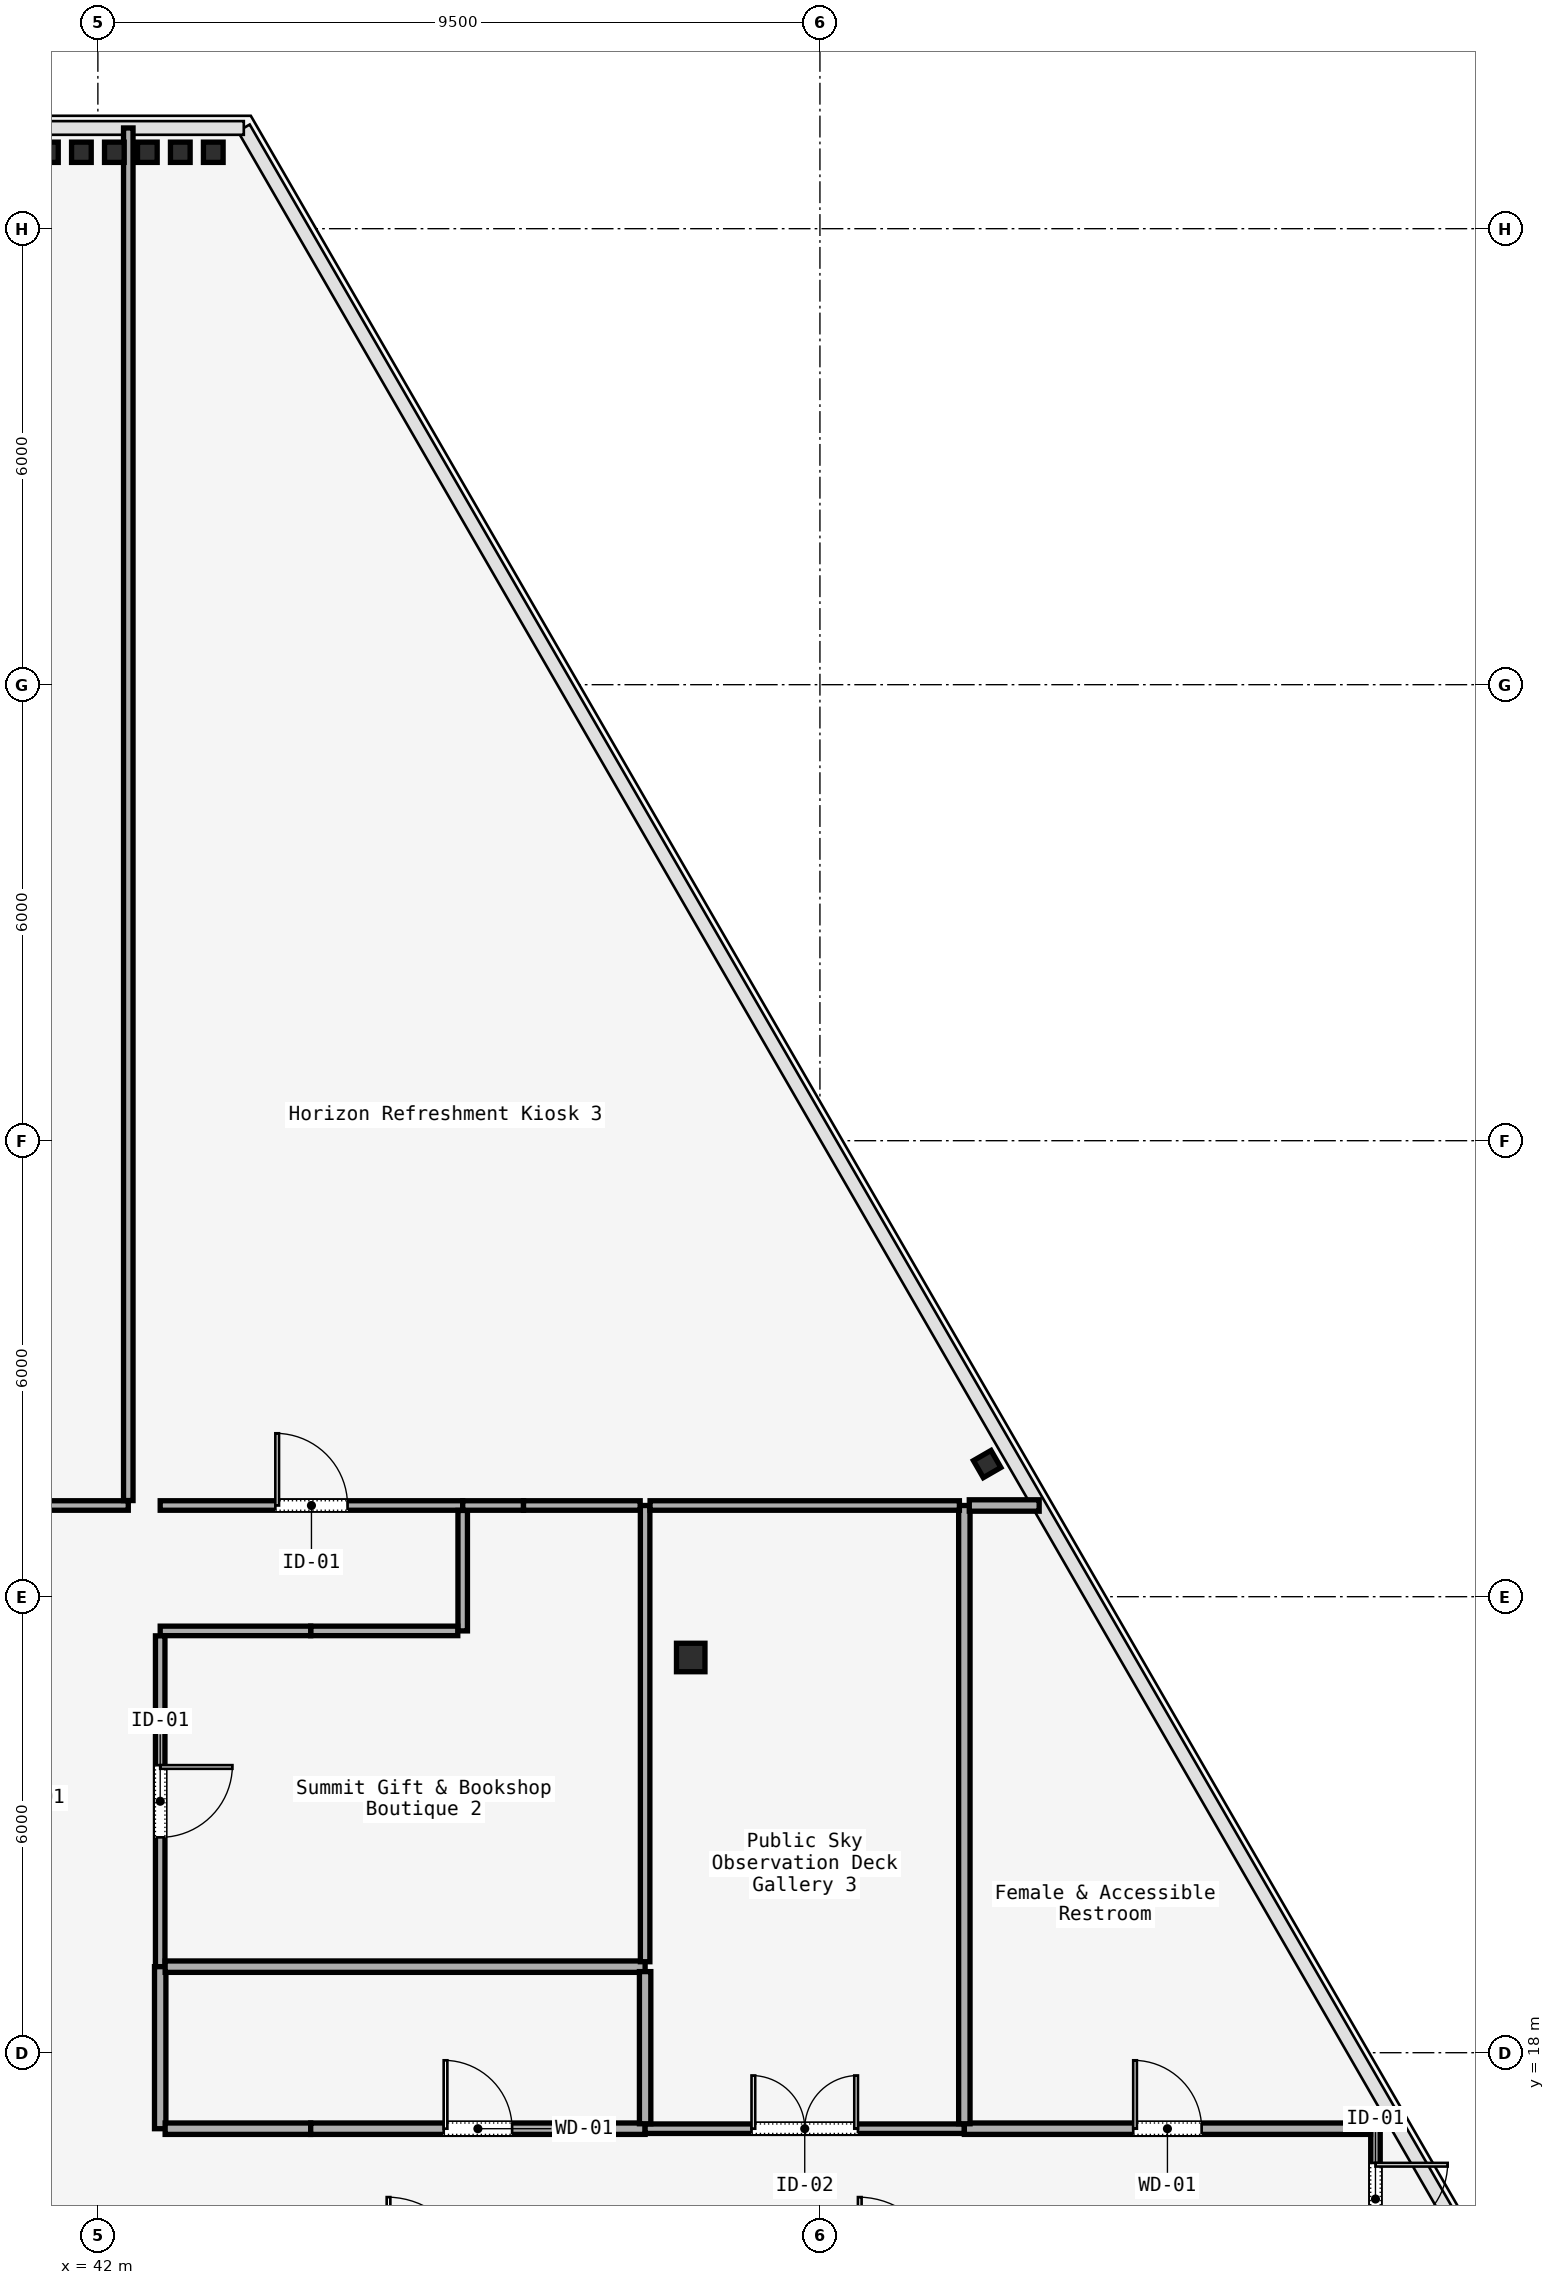
"""IFC4 building model, lengths in metres.
Left out: names, types, materials, properties, quantities, classifications, styles, units other than length and angle.
Written with IfcOpenShell. Run it as: python <this file> out.ifc"""

import sys

from ifc_helpers import new_model, si_unit, direction, frame, frame_2d, origin, origin_2d, place, context, subcontext, project, spatial, rectangle, i_section, extrude, element, fill, save


model = new_model("IFC4")
c1 = context("Model", 3, precision=1e-05, world=origin(), true_north=direction((0.0, 1.0)))
c2 = subcontext(c1, "Body", "Model", "MODEL_VIEW")
j1 = project(units=[si_unit("LENGTHUNIT", "METRE"), si_unit("PLANEANGLEUNIT", "RADIAN")], contexts=[c1])
p1 = place(None, origin())
s1 = spatial("IfcSite", under=j1, at=p1, CompositionType="ELEMENT")
p2 = place(p1, origin())
s2 = spatial("IfcBuilding", under=s1, at=p2, CompositionType="ELEMENT")
p3 = place(p2, frame((0.0, 0.0, 303.3)))
s3 = spatial("IfcBuildingStorey", under=s2, at=p3, CompositionType="ELEMENT", Elevation=303.3)
p4 = place(p3, frame((49.8, 23.2, 0.0), z_axis=(0.0, 0.0, 1.0), x_axis=(1.0, 0.0, 0.0)))
e1 = element("IfcColumn", 1, at=p4, inside=s3, PredefinedType="COLUMN", context=c2, shape_type="SweptSolid", body=[
    extrude(i_section(OverallWidth=0.375, OverallDepth=0.375, WebThickness=0.017, FlangeThickness=0.027, FilletRadius=0.015, at=origin_2d()), origin(), (0.0, 0.0, 1.0), 4.4),
])
for number, where, z_axis, x_axis in (
    (2, (53.7, 25.745, 0.0), (0.0, 0.0, 1.0), (-0.5, 0.866, 0.0)),
    (3, (43.518, 43.005, 0.0), (0.0, 0.0, 1.0), (1.0, 0.0, 0.0)),
    (4, (43.084, 43.005, 0.0), (0.0, 0.0, 1.0), (1.0, 0.0, 0.0)),
    (5, (42.651, 43.005, 0.0), (0.0, 0.0, 1.0), (1.0, 0.0, 0.0)),
    (6, (42.217, 43.005, 0.0), (0.0, 0.0, 1.0), (1.0, 0.0, 0.0)),
    (7, (41.783, 43.005, 0.0), (0.0, 0.0, 1.0), (1.0, 0.0, 0.0)),
    (8, (41.349, 43.005, 0.0), (0.0, 0.0, 1.0), (1.0, 0.0, 0.0)),
):
    element("IfcColumn", number, at=place(p3, frame(where, z_axis=z_axis, x_axis=x_axis)), inside=s3, PredefinedType="COLUMN", context=c2, shape_type="SweptSolid", body=[
        extrude(i_section(OverallWidth=0.259, OverallDepth=0.267, WebThickness=0.013, FlangeThickness=0.021, FilletRadius=0.013, at=origin_2d()), origin(), (0.0, 0.0, 1.0), 4.4),
    ])
p5 = place(p3, frame((58.809, 17.0, 0.0), z_axis=(0.0, 0.0, 1.0), x_axis=(0.0, -1.0, 0.0)))
e9 = element("IfcWall", 9, at=p5, inside=s3, PredefinedType="PARTITIONING", context=c2, shape_type="SweptSolid", body=[
    extrude(rectangle(XDim=1.85, YDim=0.125, at=frame_2d((0.925, 0.0))), origin(), (0.0, 0.0, 1.0), 4.36),
])
p6 = place(p5, frame((0.45, 0.0, 0.0)))
e10 = element("IfcOpeningElement", 10, at=p6, cuts=e9, PredefinedType="OPENING", context=c2, shape_type="SweptSolid", body=[
    extrude(rectangle(XDim=0.95, YDim=2.2, at=frame_2d((0.475, 1.1))), frame((0.0, 0.062, 0.0), z_axis=(0.0, -1.0, 0.0), x_axis=(1.0, 0.0, 0.0)), (0.0, 0.0, 1.0), 0.125),
])
p7 = place(p3, frame((41.18, 25.2, 0.0), z_axis=(0.0, 0.0, 1.0), x_axis=(1.0, 0.0, 0.0)))
e11 = element("IfcWall", 11, at=p7, inside=s3, PredefinedType="PARTITIONING", context=c2, shape_type="SweptSolid", body=[
    extrude(rectangle(XDim=1.22, YDim=0.125, at=frame_2d((0.61, 0.0))), origin(), (0.0, 0.0, 1.0), 4.36),
])
p8 = place(p3, frame((42.82, 25.2, 0.0), z_axis=(0.0, 0.0, 1.0), x_axis=(1.0, 0.0, 0.0)))
e12 = element("IfcWall", 12, at=p8, inside=s3, PredefinedType="PARTITIONING", context=c2, shape_type="SweptSolid", body=[
    extrude(rectangle(XDim=3.98, YDim=0.125, at=frame_2d((1.99, 0.0))), origin(), (0.0, 0.0, 1.0), 4.36),
])
p9 = place(p8, frame((1.515, 0.0, 0.0)))
e13 = element("IfcOpeningElement", 13, at=p9, cuts=e12, PredefinedType="OPENING", context=c2, shape_type="SweptSolid", body=[
    extrude(rectangle(XDim=0.95, YDim=2.2, at=frame_2d((0.475, 1.1))), frame((0.0, 0.062, 0.0), z_axis=(0.0, -1.0, 0.0), x_axis=(1.0, 0.0, 0.0)), (0.0, 0.0, 1.0), 0.125),
])
p10 = place(p3, frame((46.8, 25.135, 0.0), z_axis=(0.0, 0.0, 1.0), x_axis=(0.0, -1.0, 0.0)))
e14 = element("IfcWall", 14, at=p10, inside=s3, PredefinedType="PARTITIONING", context=c2, shape_type="SweptSolid", body=[
    extrude(rectangle(XDim=1.585, YDim=0.125, at=frame_2d((0.792, 0.0))), origin(), (0.0, 0.0, 1.0), 4.36),
])
p11 = place(p3, frame((46.735, 23.55, 0.0), z_axis=(0.0, 0.0, 1.0), x_axis=(-1.0, 0.0, 0.0)))
e15 = element("IfcWall", 15, at=p11, inside=s3, PredefinedType="PARTITIONING", context=c2, shape_type="SweptSolid", body=[
    extrude(rectangle(XDim=1.935, YDim=0.125, at=frame_2d((0.968, 0.0))), origin(), (0.0, 0.0, 1.0), 4.36),
])
p12 = place(p3, frame((44.8, 23.55, 0.0), z_axis=(0.0, 0.0, 1.0), x_axis=(-1.0, 0.0, 0.0)))
e16 = element("IfcWall", 16, at=p12, inside=s3, PredefinedType="PARTITIONING", context=c2, shape_type="SweptSolid", body=[
    extrude(rectangle(XDim=1.98, YDim=0.125, at=frame_2d((0.99, 0.0))), origin(), (0.0, 0.0, 1.0), 4.36),
])
p13 = place(p3, frame((42.82, 23.485, 0.0), z_axis=(0.0, 0.0, 1.0), x_axis=(0.0, -1.0, 0.0)))
e17 = element("IfcWall", 17, at=p13, inside=s3, PredefinedType="PARTITIONING", context=c2, shape_type="SweptSolid", body=[
    extrude(rectangle(XDim=4.353, YDim=0.125, at=frame_2d((2.177, 0.0))), origin(), (0.0, 0.0, 1.0), 4.36),
])
p14 = place(p13, frame((1.701, 0.0, 0.0)))
e18 = element("IfcOpeningElement", 18, at=p14, cuts=e17, PredefinedType="OPENING", context=c2, shape_type="SweptSolid", body=[
    extrude(rectangle(XDim=0.95, YDim=2.2, at=frame_2d((0.475, 1.1))), frame((0.0, 0.062, 0.0), z_axis=(0.0, -1.0, 0.0), x_axis=(1.0, 0.0, 0.0)), (0.0, 0.0, 1.0), 0.125),
])
p15 = place(p3, frame((42.82, 19.132, 0.0), z_axis=(0.0, 0.0, 1.0), x_axis=(0.0, -1.0, 0.0)))
e19 = element("IfcWall", 19, at=p15, inside=s3, PredefinedType="PARTITIONING", context=c2, shape_type="SweptSolid", body=[
    extrude(rectangle(XDim=2.132, YDim=0.15, at=frame_2d((1.066, 0.0))), origin(), (0.0, 0.0, 1.0), 4.36),
])
p16 = place(p3, frame((42.885, 17.0, 0.0), z_axis=(0.0, 0.0, 1.0), x_axis=(1.0, 0.0, 0.0)))
e20 = element("IfcWall", 20, at=p16, inside=s3, PredefinedType="PARTITIONING", context=c2, shape_type="SweptSolid", body=[
    extrude(rectangle(XDim=1.915, YDim=0.15, at=frame_2d((0.958, 0.0))), origin(), (0.0, 0.0, 1.0), 4.36),
])
p17 = place(p3, frame((44.8, 17.0, 0.0), z_axis=(0.0, 0.0, 1.0), x_axis=(1.0, 0.0, 0.0)))
e21 = element("IfcWall", 21, at=p17, inside=s3, PredefinedType="PARTITIONING", context=c2, shape_type="SweptSolid", body=[
    extrude(rectangle(XDim=4.4, YDim=0.15, at=frame_2d((2.2, 0.0))), origin(), (0.0, 0.0, 1.0), 4.36),
])
p18 = place(p17, frame((1.75, 0.0, 0.0)))
e22 = element("IfcOpeningElement", 22, at=p18, cuts=e21, PredefinedType="OPENING", context=c2, shape_type="SweptSolid", body=[
    extrude(rectangle(XDim=0.9, YDim=2.15, at=frame_2d((0.45, 1.075))), frame((0.0, 0.075, 0.0), z_axis=(0.0, -1.0, 0.0), x_axis=(1.0, 0.0, 0.0)), (0.0, 0.0, 1.0), 0.15),
])
p19 = place(p3, frame((49.2, 17.0, 0.0), z_axis=(0.0, 0.0, 1.0), x_axis=(1.0, 0.0, 0.0)))
e23 = element("IfcWall", 23, at=p19, inside=s3, PredefinedType="PARTITIONING", context=c2, shape_type="SweptSolid", body=[
    extrude(rectangle(XDim=4.2, YDim=0.125, at=frame_2d((2.1, 0.0))), origin(), (0.0, 0.0, 1.0), 4.36),
])
p20 = place(p19, frame((1.4, 0.0, 0.0)))
e24 = element("IfcOpeningElement", 24, at=p20, cuts=e23, PredefinedType="OPENING", context=c2, shape_type="SweptSolid", body=[
    extrude(rectangle(XDim=1.4, YDim=2.2, at=frame_2d((0.7, 1.1))), frame((0.0, 0.062, 0.0), z_axis=(0.0, -1.0, 0.0), x_axis=(1.0, 0.0, 0.0)), (0.0, 0.0, 1.0), 0.125),
])
p21 = place(p3, frame((53.4, 17.0, 0.0), z_axis=(0.0, 0.0, 1.0), x_axis=(1.0, 0.0, 0.0)))
e25 = element("IfcWall", 25, at=p21, inside=s3, PredefinedType="PARTITIONING", context=c2, shape_type="SweptSolid", body=[
    extrude(rectangle(XDim=5.344, YDim=0.15, at=frame_2d((2.672, 0.0))), origin(), (0.0, 0.0, 1.0), 4.36),
])
p22 = place(p21, frame((2.222, 0.0, 0.0)))
e26 = element("IfcOpeningElement", 26, at=p22, cuts=e25, PredefinedType="OPENING", context=c2, shape_type="SweptSolid", body=[
    extrude(rectangle(XDim=0.9, YDim=2.15, at=frame_2d((0.45, 1.075))), frame((0.0, 0.075, 0.0), z_axis=(0.0, -1.0, 0.0), x_axis=(1.0, 0.0, 0.0)), (0.0, 0.0, 1.0), 0.15),
])
p23 = place(p3, frame((42.885, 19.132, 0.0), z_axis=(0.0, 0.0, 1.0), x_axis=(1.0, 0.0, 0.0)))
e27 = element("IfcWall", 27, at=p23, inside=s3, PredefinedType="PARTITIONING", context=c2, shape_type="SweptSolid", body=[
    extrude(rectangle(XDim=6.315, YDim=0.15, at=frame_2d((3.157, 0.0))), origin(), (0.0, 0.0, 1.0), 4.36),
])
p24 = place(p3, frame((49.2, 19.067, 0.0), z_axis=(0.0, 0.0, 1.0), x_axis=(0.0, -1.0, 0.0)))
e28 = element("IfcWall", 28, at=p24, inside=s3, PredefinedType="PARTITIONING", context=c2, shape_type="SweptSolid", body=[
    extrude(rectangle(XDim=2.002, YDim=0.15, at=frame_2d((1.001, 0.0))), origin(), (0.0, 0.0, 1.0), 4.36),
])
p25 = place(p3, frame((53.4, 17.065, 0.0), z_axis=(0.0, 0.0, 1.0), x_axis=(0.0, 1.0, 0.0)))
e29 = element("IfcWall", 29, at=p25, inside=s3, PredefinedType="PARTITIONING", context=c2, shape_type="SweptSolid", body=[
    extrude(rectangle(XDim=8.135, YDim=0.15, at=frame_2d((4.067, 0.0))), origin(), (0.0, 0.0, 1.0), 4.36),
])
p26 = place(p3, frame((53.465, 25.2, 0.0), z_axis=(0.0, 0.0, 1.0), x_axis=(1.0, 0.0, 0.0)))
e30 = element("IfcWall", 30, at=p26, inside=s3, PredefinedType="PARTITIONING", context=c2, shape_type="SweptSolid", body=[
    extrude(rectangle(XDim=0.919, YDim=0.15, at=frame_2d((0.46, 0.0))), origin(), (0.0, 0.0, 1.0), 4.36),
])
p27 = place(p3, frame((49.2, 19.197, 0.0), z_axis=(0.0, 0.0, 1.0), x_axis=(0.0, 1.0, 0.0)))
e31 = element("IfcWall", 31, at=p27, inside=s3, PredefinedType="PARTITIONING", context=c2, shape_type="SweptSolid", body=[
    extrude(rectangle(XDim=6.003, YDim=0.125, at=frame_2d((3.001, 0.0))), origin(), (0.0, 0.0, 1.0), 4.36),
])
p28 = place(p3, frame((49.265, 25.2, 0.0), z_axis=(0.0, 0.0, 1.0), x_axis=(1.0, 0.0, 0.0)))
e32 = element("IfcWall", 32, at=p28, inside=s3, PredefinedType="PARTITIONING", context=c2, shape_type="SweptSolid", body=[
    extrude(rectangle(XDim=4.07, YDim=0.125, at=frame_2d((2.035, 0.0))), origin(), (0.0, 0.0, 1.0), 4.36),
])
p29 = place(p3, frame((46.8, 25.2, 0.0), z_axis=(0.0, 0.0, 1.0), x_axis=(1.0, 0.0, 0.0)))
e33 = element("IfcWall", 33, at=p29, inside=s3, PredefinedType="PARTITIONING", context=c2, shape_type="SweptSolid", body=[
    extrude(rectangle(XDim=0.8, YDim=0.125, at=frame_2d((0.4, 0.0))), origin(), (0.0, 0.0, 1.0), 4.36),
])
p30 = place(p3, frame((47.6, 25.2, 0.0), z_axis=(0.0, 0.0, 1.0), x_axis=(1.0, 0.0, 0.0)))
e34 = element("IfcWall", 34, at=p30, inside=s3, PredefinedType="PARTITIONING", context=c2, shape_type="SweptSolid", body=[
    extrude(rectangle(XDim=1.535, YDim=0.125, at=frame_2d((0.768, 0.0))), origin(), (0.0, 0.0, 1.0), 4.36),
])
p31 = place(p3, frame((42.4, 25.265, 0.0), z_axis=(0.0, 0.0, 1.0), x_axis=(0.0, 1.0, 0.0)))
e35 = element("IfcWall", 35, at=p31, inside=s3, PredefinedType="PARTITIONING", context=c2, shape_type="SweptSolid", body=[
    extrude(rectangle(XDim=18.061, YDim=0.125, at=frame_2d((9.03, 0.0))), origin(), (0.0, 0.0, 1.0), 4.36),
])
p32 = place(p6, origin())
e36 = element("IfcDoor", 36, at=p32, inside=s3, OperationType="SINGLE_SWING_RIGHT", PredefinedType="DOOR", context=c2, shape_type="SweptSolid", body=[
    extrude(rectangle(XDim=0.95, YDim=2.2, at=frame_2d((0.475, 1.1))), frame((0.0, 0.025, 0.0), z_axis=(0.0, -1.0, 0.0), x_axis=(1.0, 0.0, 0.0)), (0.0, 0.0, 1.0), 0.05),
])
fill(e10, e36)
p33 = place(p18, origin())
e37 = element("IfcDoor", 37, at=p33, inside=s3, OperationType="SINGLE_SWING_LEFT", PredefinedType="DOOR", context=c2, shape_type="SweptSolid", body=[
    extrude(rectangle(XDim=0.9, YDim=2.15, at=frame_2d((0.45, 1.075))), frame((0.0, 0.025, 0.0), z_axis=(0.0, -1.0, 0.0), x_axis=(1.0, 0.0, 0.0)), (0.0, 0.0, 1.0), 0.05),
])
fill(e22, e37)
p34 = place(p22, origin())
e38 = element("IfcDoor", 38, at=p34, inside=s3, OperationType="SINGLE_SWING_RIGHT", PredefinedType="DOOR", context=c2, shape_type="SweptSolid", body=[
    extrude(rectangle(XDim=0.9, YDim=2.15, at=frame_2d((0.45, 1.075))), frame((0.0, 0.025, 0.0), z_axis=(0.0, -1.0, 0.0), x_axis=(1.0, 0.0, 0.0)), (0.0, 0.0, 1.0), 0.05),
])
fill(e26, e38)
p35 = place(p20, origin())
e39 = element("IfcDoor", 39, at=p35, inside=s3, OperationType="SINGLE_SWING_RIGHT", PredefinedType="DOOR", context=c2, shape_type="SweptSolid", body=[
    extrude(rectangle(XDim=1.4, YDim=2.2, at=frame_2d((0.7, 1.1))), frame((0.0, 0.025, 0.0), z_axis=(0.0, -1.0, 0.0), x_axis=(1.0, 0.0, 0.0)), (0.0, 0.0, 1.0), 0.05),
])
fill(e24, e39)
p36 = place(p14, origin())
e40 = element("IfcDoor", 40, at=p36, inside=s3, OperationType="SINGLE_SWING_LEFT", PredefinedType="DOOR", context=c2, shape_type="SweptSolid", body=[
    extrude(rectangle(XDim=0.95, YDim=2.2, at=frame_2d((0.475, 1.1))), frame((0.0, 0.025, 0.0), z_axis=(0.0, -1.0, 0.0), x_axis=(1.0, 0.0, 0.0)), (0.0, 0.0, 1.0), 0.05),
])
fill(e18, e40)
p37 = place(p9, origin())
e41 = element("IfcDoor", 41, at=p37, inside=s3, OperationType="SINGLE_SWING_RIGHT", PredefinedType="DOOR", context=c2, shape_type="SweptSolid", body=[
    extrude(rectangle(XDim=0.95, YDim=2.2, at=frame_2d((0.475, 1.1))), frame((0.0, 0.025, 0.0), z_axis=(0.0, -1.0, 0.0), x_axis=(1.0, 0.0, 0.0)), (0.0, 0.0, 1.0), 0.05),
])
fill(e13, e41)
save(model, sys.argv[1])
